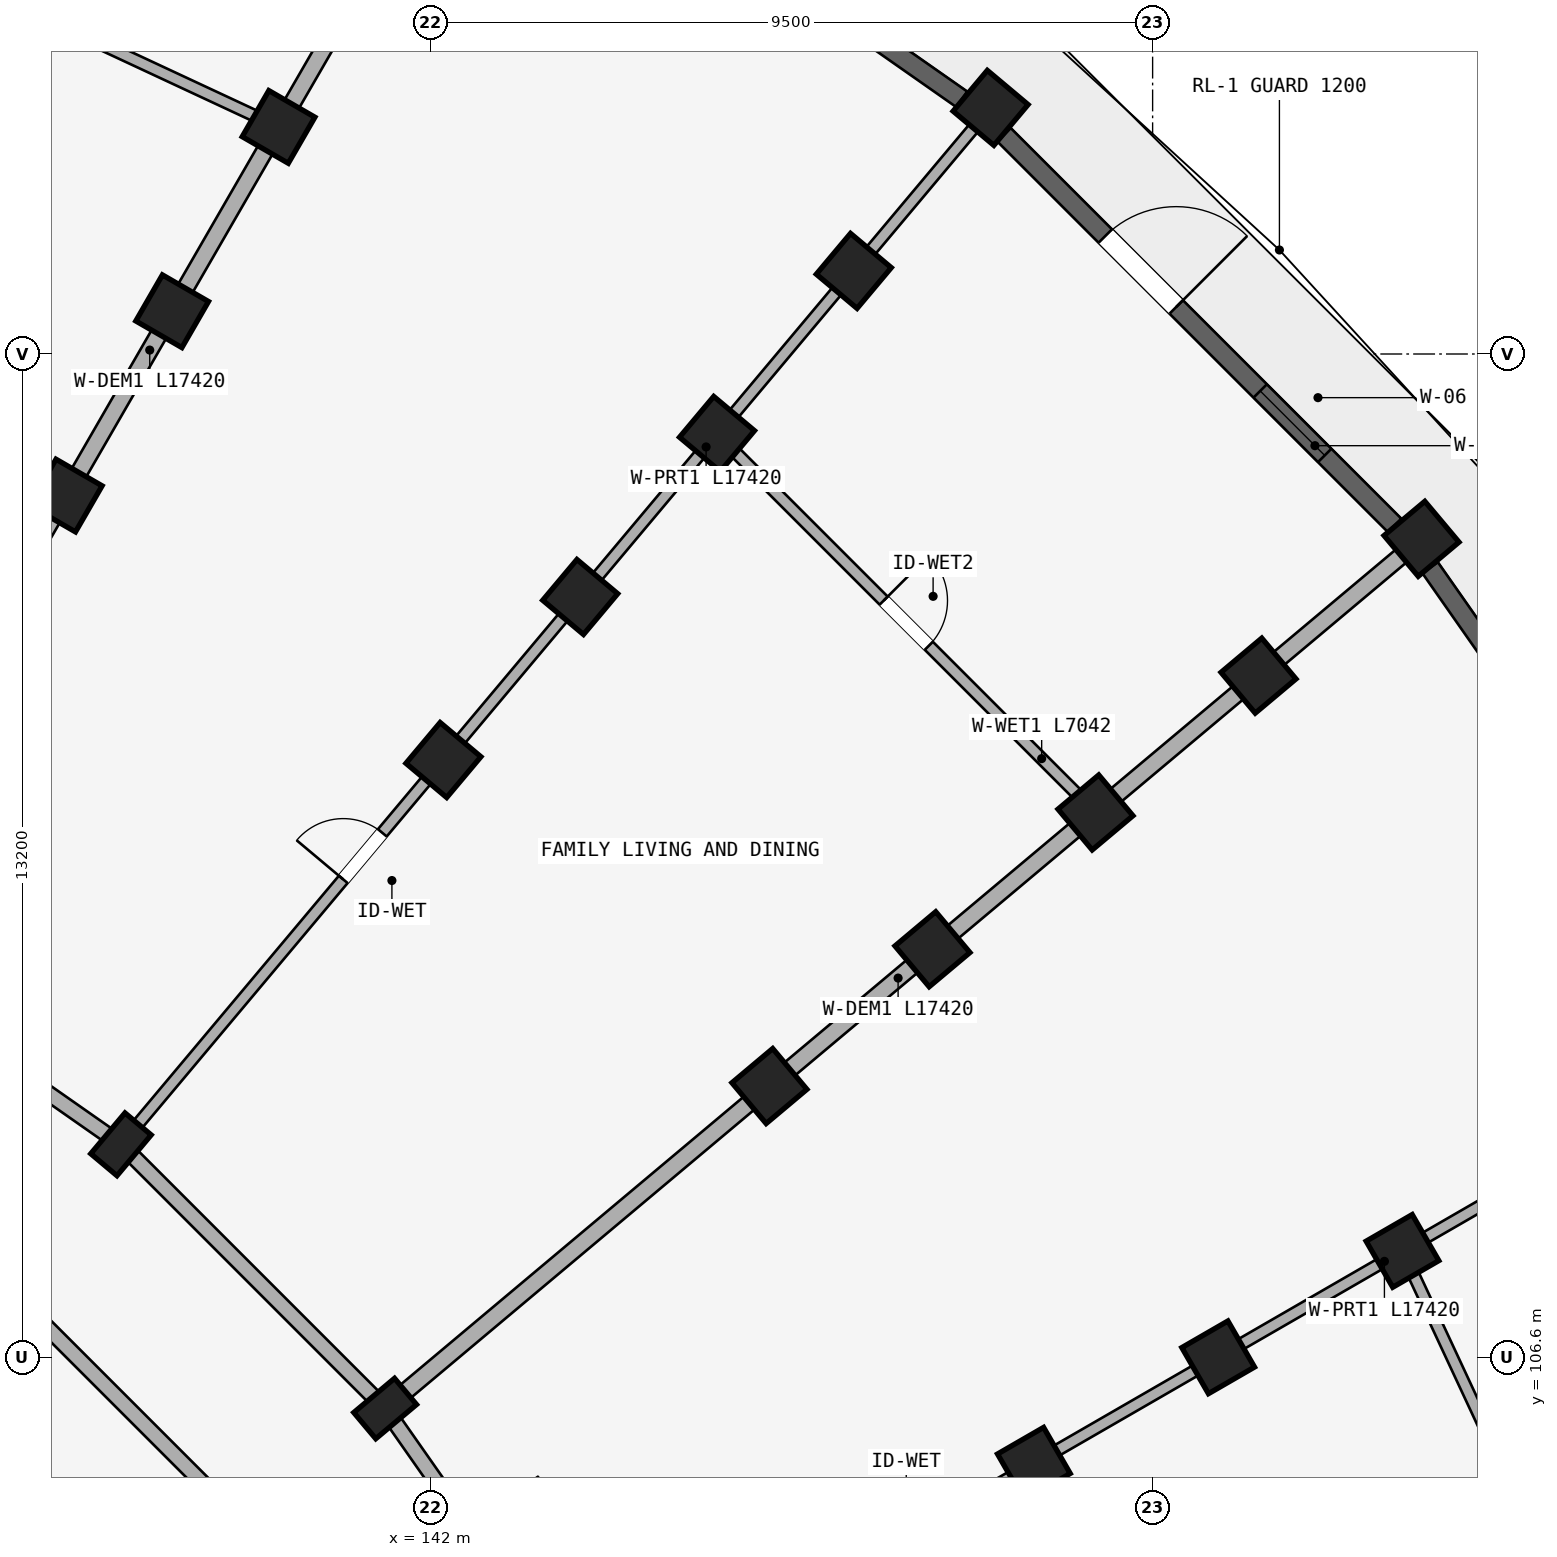
"""IFC4 building model, lengths in metres.
Left out: names, types, materials, properties, quantities, classifications, styles, units other than length and angle.
Written with IfcOpenShell. Run it as: python <this file> out.ifc"""

import sys

from ifc_helpers import new_model, si_unit, direction, frame, frame_2d, origin, origin_2d, place, context, subcontext, project, spatial, rectangle, extrude, element, fill, save


model = new_model("IFC4")
c1 = context("Model", 3, precision=1e-05, world=origin(), true_north=direction((0.0, 1.0)))
c2 = subcontext(c1, "Body", "Model", "MODEL_VIEW")
j1 = project(units=[si_unit("LENGTHUNIT", "METRE"), si_unit("PLANEANGLEUNIT", "RADIAN")], contexts=[c1])
p1 = place(None, origin())
s1 = spatial("IfcSite", under=j1, at=p1, CompositionType="ELEMENT")
p2 = place(p1, origin())
s2 = spatial("IfcBuilding", under=s1, at=p2, CompositionType="ELEMENT")
p3 = place(p2, frame((0.0, 0.0, 21.3)))
s3 = spatial("IfcBuildingStorey", under=s2, at=p3, CompositionType="ELEMENT", Elevation=21.3)
for number, where, z_axis, x_axis in (
    (1, (137.2, 117.938, 0.0), (0.0, 0.0, 1.0), (-0.866, 0.5, 0.0)),
    (2, (138.6, 120.363, 0.0), (0.0, 0.0, 1.0), (-0.866, 0.5, 0.0)),
    (3, (140.0, 122.787, 0.0), (0.0, 0.0, 1.0), (-0.866, 0.5, 0.0)),
):
    element("IfcColumn", number, at=place(p3, frame(where, z_axis=z_axis, x_axis=x_axis)), inside=s3, PredefinedType="COLUMN", context=c2, shape_type="SweptSolid", body=[
        extrude(rectangle(XDim=0.7, YDim=0.7, at=origin_2d()), origin(), (0.0, 0.0, 1.0), 2.93),
    ])
p4 = place(p3, frame((137.927, 109.402, 0.0), z_axis=(0.0, 0.0, 1.0), x_axis=(-0.766044443119, 0.642787609687, 0.0)))
e4 = element("IfcColumn", 4, at=p4, inside=s3, PredefinedType="COLUMN", context=c2, shape_type="SweptSolid", body=[
    extrude(rectangle(XDim=0.45, YDim=0.7, at=origin_2d()), origin(), (0.0, 0.0, 1.0), 2.93),
])
for number, where, z_axis, x_axis in (
    (5, (142.169, 114.458, 0.0), (0.0, 0.0, 1.0), (-0.766, 0.643, 0.0)),
    (6, (143.969, 116.603, 0.0), (0.0, 0.0, 1.0), (-0.766, 0.643, 0.0)),
    (7, (145.769, 118.748, 0.0), (0.0, 0.0, 1.0), (-0.766, 0.643, 0.0)),
    (8, (147.568, 120.893, 0.0), (0.0, 0.0, 1.0), (-0.766, 0.643, 0.0)),
    (9, (149.368, 123.038, 0.0), (0.0, 0.0, 1.0), (-0.766, 0.643, 0.0)),
):
    element("IfcColumn", number, at=place(p3, frame(where, z_axis=z_axis, x_axis=x_axis)), inside=s3, PredefinedType="COLUMN", context=c2, shape_type="SweptSolid", body=[
        extrude(rectangle(XDim=0.7, YDim=0.7, at=origin_2d()), origin(), (0.0, 0.0, 1.0), 2.93),
    ])
p5 = place(p3, frame((141.402, 105.927, 0.0), z_axis=(0.0, 0.0, 1.0), x_axis=(-0.642787609687, 0.766044443119, 0.0)))
e10 = element("IfcColumn", 10, at=p5, inside=s3, PredefinedType="COLUMN", context=c2, shape_type="SweptSolid", body=[
    extrude(rectangle(XDim=0.45, YDim=0.7, at=origin_2d()), origin(), (0.0, 0.0, 1.0), 2.93),
])
for number, where, z_axis, x_axis in (
    (11, (146.458, 110.169, 0.0), (0.0, 0.0, 1.0), (-0.643, 0.766, 0.0)),
    (12, (148.603, 111.969, 0.0), (0.0, 0.0, 1.0), (-0.643, 0.766, 0.0)),
    (13, (150.748, 113.769, 0.0), (0.0, 0.0, 1.0), (-0.643, 0.766, 0.0)),
    (14, (152.893, 115.568, 0.0), (0.0, 0.0, 1.0), (-0.643, 0.766, 0.0)),
    (15, (155.038, 117.368, 0.0), (0.0, 0.0, 1.0), (-0.643, 0.766, 0.0)),
    (16, (149.938, 105.2, 0.0), (0.0, 0.0, 1.0), (-0.5, 0.866, 0.0)),
    (17, (152.363, 106.6, 0.0), (0.0, 0.0, 1.0), (-0.5, 0.866, 0.0)),
    (18, (154.787, 108.0, 0.0), (0.0, 0.0, 1.0), (-0.5, 0.866, 0.0)),
):
    element("IfcColumn", number, at=place(p3, frame(where, z_axis=z_axis, x_axis=x_axis)), inside=s3, PredefinedType="COLUMN", context=c2, shape_type="SweptSolid", body=[
        extrude(rectangle(XDim=0.7, YDim=0.7, at=origin_2d()), origin(), (0.0, 0.0, 1.0), 2.93),
    ])
p6 = place(p3, frame((133.9, 112.222, 0.0), z_axis=(0.0, 0.0, 1.0), x_axis=(0.819140911474, -0.573592335331, 0.0)))
e19 = element("IfcWall", 19, at=p6, inside=s3, PredefinedType="STANDARD", context=c2, shape_type="SweptSolid", body=[
    extrude(rectangle(XDim=4.916, YDim=0.2, at=frame_2d((2.458, 0.0))), origin(), (0.0, 0.0, 1.0), 2.372),
])
p7 = place(p6, frame((1.918, 0.0, 0.0)))
e20 = element("IfcOpeningElement", 20, at=p7, cuts=e19, PredefinedType="OPENING", context=c2, shape_type="SweptSolid", body=[
    extrude(rectangle(XDim=1.08, YDim=2.15, at=frame_2d((0.54, 1.075))), frame((0.0, 0.11, 0.0), z_axis=(0.0, -1.0, 0.0), x_axis=(1.0, 0.0, 0.0)), (0.0, 0.0, 1.0), 0.22),
])
p8 = place(p3, frame((136.384, 107.564, 0.0), z_axis=(0.0, 0.0, 1.0), x_axis=(0.707106781187, -0.707106781187, 0.0)))
e21 = element("IfcWall", 21, at=p8, inside=s3, PredefinedType="STANDARD", context=c2, shape_type="SweptSolid", body=[
    extrude(rectangle(XDim=4.497, YDim=0.2, at=frame_2d((2.249, 0.0))), origin(), (0.0, 0.0, 1.0), 2.372),
])
p9 = place(p3, frame((137.927, 109.402, 0.0), z_axis=(0.0, 0.0, 1.0), x_axis=(0.707106781187, -0.707106781187, 0.0)))
e22 = element("IfcWall", 22, at=p9, inside=s3, PredefinedType="STANDARD", context=c2, shape_type="SweptSolid", body=[
    extrude(rectangle(XDim=4.916, YDim=0.2, at=frame_2d((2.458, 0.0))), origin(), (0.0, 0.0, 1.0), 2.372),
])
p10 = place(p3, frame((141.402, 105.927, 0.0), z_axis=(0.0, 0.0, 1.0), x_axis=(0.573592335331, -0.819140911474, 0.0)))
e23 = element("IfcWall", 23, at=p10, inside=s3, PredefinedType="STANDARD", context=c2, shape_type="SweptSolid", body=[
    extrude(rectangle(XDim=4.916, YDim=0.2, at=frame_2d((2.458, 0.0))), origin(), (0.0, 0.0, 1.0), 2.372),
])
p11 = place(p10, frame((1.888, 0.0, 0.0)))
e24 = element("IfcOpeningElement", 24, at=p11, cuts=e23, PredefinedType="OPENING", context=c2, shape_type="SweptSolid", body=[
    extrude(rectangle(XDim=1.14, YDim=2.15, at=frame_2d((0.57, 1.075))), frame((0.0, 0.11, 0.0), z_axis=(0.0, -1.0, 0.0), x_axis=(1.0, 0.0, 0.0)), (0.0, 0.0, 1.0), 0.22),
])
p12 = place(p3, frame((133.95, 112.309, 0.0), z_axis=(0.0, 0.0, 1.0), x_axis=(0.499997843263, 0.866026648973, 0.0)))
e25 = element("IfcWall", 25, at=p12, inside=s3, PredefinedType="STANDARD", context=c2, shape_type="SweptSolid", body=[
    extrude(rectangle(XDim=17.42, YDim=0.22, at=frame_2d((8.71, 0.0))), origin(), (0.0, 0.0, 1.0), 2.372),
])
p13 = place(p3, frame((137.991, 109.479, 0.0), z_axis=(0.0, 0.0, 1.0), x_axis=(0.642784757967, 0.766046835987, 0.0)))
e26 = element("IfcWall", 26, at=p13, inside=s3, PredefinedType="PARTITIONING", context=c2, shape_type="SweptSolid", body=[
    extrude(rectangle(XDim=17.42, YDim=0.15, at=frame_2d((8.71, 0.0))), origin(), (0.0, 0.0, 1.0), 2.372),
])
p14 = place(p13, frame((4.45, 0.0, 0.0)))
e27 = element("IfcOpeningElement", 27, at=p14, cuts=e26, PredefinedType="OPENING", context=c2, shape_type="SweptSolid", body=[
    extrude(rectangle(XDim=0.8, YDim=2.1, at=frame_2d((0.4, 1.05))), frame((0.0, 0.085, 0.0), z_axis=(0.0, -1.0, 0.0), x_axis=(1.0, 0.0, 0.0)), (0.0, 0.0, 1.0), 0.17),
])
p15 = place(p3, frame((141.479, 105.991, 0.0), z_axis=(0.0, 0.0, 1.0), x_axis=(0.766046835987, 0.642784757967, 0.0)))
e28 = element("IfcWall", 28, at=p15, inside=s3, PredefinedType="STANDARD", context=c2, shape_type="SweptSolid", body=[
    extrude(rectangle(XDim=17.42, YDim=0.22, at=frame_2d((8.71, 0.0))), origin(), (0.0, 0.0, 1.0), 2.372),
])
p16 = place(p3, frame((144.309, 101.95, 0.0), z_axis=(0.0, 0.0, 1.0), x_axis=(0.866026648973, 0.499997843263, 0.0)))
e29 = element("IfcWall", 29, at=p16, inside=s3, PredefinedType="PARTITIONING", context=c2, shape_type="SweptSolid", body=[
    extrude(rectangle(XDim=17.42, YDim=0.15, at=frame_2d((8.71, 0.0))), origin(), (0.0, 0.0, 1.0), 2.372),
])
p17 = place(p16, frame((4.45, 0.0, 0.0)))
e30 = element("IfcOpeningElement", 30, at=p17, cuts=e29, PredefinedType="OPENING", context=c2, shape_type="SweptSolid", body=[
    extrude(rectangle(XDim=0.8, YDim=2.1, at=frame_2d((0.4, 1.05))), frame((0.0, 0.085, 0.0), z_axis=(0.0, -1.0, 0.0), x_axis=(1.0, 0.0, 0.0)), (0.0, 0.0, 1.0), 0.17),
])
p18 = place(p3, frame((133.618, 125.764, 0.0), z_axis=(0.0, 0.0, 1.0), x_axis=(0.906297360311, -0.422640621205, 0.0)))
e31 = element("IfcWall", 31, at=p18, inside=s3, PredefinedType="PLUMBINGWALL", context=c2, shape_type="SweptSolid", body=[
    extrude(rectangle(XDim=7.042, YDim=0.15, at=frame_2d((3.521, 0.0))), origin(), (0.0, 0.0, 1.0), 2.372),
])
p19 = place(p18, frame((3.141, 0.0, 0.0)))
e32 = element("IfcOpeningElement", 32, at=p19, cuts=e31, PredefinedType="OPENING", context=c2, shape_type="SweptSolid", body=[
    extrude(rectangle(XDim=0.76, YDim=2.05, at=frame_2d((0.38, 1.025))), frame((0.0, 0.085, 0.0), z_axis=(0.0, -1.0, 0.0), x_axis=(1.0, 0.0, 0.0)), (0.0, 0.0, 1.0), 0.17),
])
p20 = place(p3, frame((145.769, 118.748, 0.0), z_axis=(0.0, 0.0, 1.0), x_axis=(0.707106781187, -0.707106781187, 0.0)))
e33 = element("IfcWall", 33, at=p20, inside=s3, PredefinedType="PLUMBINGWALL", context=c2, shape_type="SweptSolid", body=[
    extrude(rectangle(XDim=7.042, YDim=0.15, at=frame_2d((3.521, 0.0))), origin(), (0.0, 0.0, 1.0), 2.372),
])
p21 = place(p20, frame((3.101, 0.0, 0.0)))
e34 = element("IfcOpeningElement", 34, at=p21, cuts=e33, PredefinedType="OPENING", context=c2, shape_type="SweptSolid", body=[
    extrude(rectangle(XDim=0.84, YDim=2.1, at=frame_2d((0.42, 1.05))), frame((0.0, 0.085, 0.0), z_axis=(0.0, -1.0, 0.0), x_axis=(1.0, 0.0, 0.0)), (0.0, 0.0, 1.0), 0.17),
])
p22 = place(p3, frame((154.787, 108.0, 0.0), z_axis=(0.0, 0.0, 1.0), x_axis=(0.422640621205, -0.906297360311, 0.0)))
e35 = element("IfcWall", 35, at=p22, inside=s3, PredefinedType="PLUMBINGWALL", context=c2, shape_type="SweptSolid", body=[
    extrude(rectangle(XDim=7.042, YDim=0.15, at=frame_2d((3.521, 0.0))), origin(), (0.0, 0.0, 1.0), 2.372),
])
p23 = place(p22, frame((3.121, 0.0, 0.0)))
e36 = element("IfcOpeningElement", 36, at=p23, cuts=e35, PredefinedType="OPENING", context=c2, shape_type="SweptSolid", body=[
    extrude(rectangle(XDim=0.8, YDim=2.1, at=frame_2d((0.4, 1.05))), frame((0.0, 0.085, 0.0), z_axis=(0.0, -1.0, 0.0), x_axis=(1.0, 0.0, 0.0)), (0.0, 0.0, 1.0), 0.17),
])
p24 = place(p3, frame((143.036, 127.319, 0.0), z_axis=(0.0, 0.0, 1.0), x_axis=(0.819159308599, -0.573566061701, 0.0)))
e37 = element("IfcWall", 37, at=p24, inside=s3, PredefinedType="STANDARD", context=c2, shape_type="SweptSolid", body=[
    extrude(rectangle(XDim=7.267, YDim=0.25, at=frame_2d((3.633, 0.0))), origin(), (0.0, 0.0, 1.0), 2.472),
])
p25 = place(p24, frame((2.508, 0.0, 0.322)))
e38 = element("IfcOpeningElement", 38, at=p25, cuts=e37, PredefinedType="OPENING", context=c2, shape_type="SweptSolid", body=[
    extrude(rectangle(XDim=2.25, YDim=1.95, at=frame_2d((1.125, 0.975))), frame((0.0, 0.135, 0.0), z_axis=(0.0, -1.0, 0.0), x_axis=(1.0, 0.0, 0.0)), (0.0, 0.0, 1.0), 0.27),
])
p26 = place(p3, frame((149.546, 122.684, 0.0), z_axis=(0.0, 0.0, 1.0), x_axis=(0.707106781187, -0.707106781187, 0.0)))
e39 = element("IfcWall", 39, at=p26, inside=s3, PredefinedType="STANDARD", context=c2, shape_type="SweptSolid", body=[
    extrude(rectangle(XDim=7.267, YDim=0.25, at=frame_2d((3.633, 0.0))), origin(), (0.0, 0.0, 1.0), 2.472),
])
p27 = place(p26, frame((4.766, 0.0, 0.472)))
e40 = element("IfcOpeningElement", 40, at=p27, cuts=e39, PredefinedType="OPENING", context=c2, shape_type="SweptSolid", body=[
    extrude(rectangle(XDim=1.2, YDim=1.5, at=frame_2d((0.6, 0.75))), frame((0.0, 0.135, 0.0), z_axis=(0.0, -1.0, 0.0), x_axis=(1.0, 0.0, 0.0)), (0.0, 0.0, 1.0), 0.27),
])
p28 = place(p26, frame((1.883, 0.0, 0.0)))
e41 = element("IfcOpeningElement", 41, at=p28, cuts=e39, PredefinedType="OPENING", context=c2, shape_type="SweptSolid", body=[
    extrude(rectangle(XDim=1.32, YDim=2.15, at=frame_2d((0.66, 1.075))), frame((0.0, 0.135, 0.0), z_axis=(0.0, -1.0, 0.0), x_axis=(1.0, 0.0, 0.0)), (0.0, 0.0, 1.0), 0.27),
])
p29 = place(p3, frame((155.151, 116.989, 0.0), z_axis=(0.0, 0.0, 1.0), x_axis=(0.573566061701, -0.819159308599, 0.0)))
e42 = element("IfcWall", 42, at=p29, inside=s3, PredefinedType="STANDARD", context=c2, shape_type="SweptSolid", body=[
    extrude(rectangle(XDim=7.267, YDim=0.25, at=frame_2d((3.633, 0.0))), origin(), (0.0, 0.0, 1.0), 2.472),
])
p30 = place(p29, frame((2.658, 0.0, 0.422)))
e43 = element("IfcOpeningElement", 43, at=p30, cuts=e42, PredefinedType="OPENING", context=c2, shape_type="SweptSolid", body=[
    extrude(rectangle(XDim=1.95, YDim=1.85, at=frame_2d((0.975, 0.925))), frame((0.0, 0.135, 0.0), z_axis=(0.0, -1.0, 0.0), x_axis=(1.0, 0.0, 0.0)), (0.0, 0.0, 1.0), 0.27),
])
p31 = place(p27, origin())
e44 = element("IfcWindow", 44, at=p31, inside=s3, PartitioningType="SINGLE_PANEL", PredefinedType="WINDOW", context=c2, shape_type="SweptSolid", body=[
    extrude(rectangle(XDim=1.2, YDim=1.5, at=frame_2d((0.6, 0.75))), frame((0.0, 0.03, 0.0), z_axis=(0.0, -1.0, 0.0), x_axis=(1.0, 0.0, 0.0)), (0.0, 0.0, 1.0), 0.06),
])
fill(e40, e44)
p32 = place(p14, origin())
e45 = element("IfcDoor", 45, at=p32, inside=s3, OperationType="SINGLE_SWING_LEFT", PredefinedType="DOOR", context=c2, shape_type="SweptSolid", body=[
    extrude(rectangle(XDim=0.8, YDim=2.1, at=frame_2d((0.4, 1.05))), frame((0.0, 0.025, 0.0), z_axis=(0.0, -1.0, 0.0), x_axis=(1.0, 0.0, 0.0)), (0.0, 0.0, 1.0), 0.05),
])
fill(e27, e45)
p33 = place(p21, frame((0.84, 0.0, 0.0), z_axis=(0.0, 0.0, 1.0), x_axis=(-1.0, 0.0, 0.0)))
e46 = element("IfcDoor", 46, at=p33, inside=s3, OperationType="SINGLE_SWING_RIGHT", PredefinedType="DOOR", context=c2, shape_type="SweptSolid", body=[
    extrude(rectangle(XDim=0.84, YDim=2.1, at=frame_2d((0.42, 1.05))), frame((0.0, 0.025, 0.0), z_axis=(0.0, -1.0, 0.0), x_axis=(1.0, 0.0, 0.0)), (0.0, 0.0, 1.0), 0.05),
])
fill(e34, e46)
p34 = place(p28, origin())
e47 = element("IfcDoor", 47, at=p34, inside=s3, OperationType="SINGLE_SWING_RIGHT", PredefinedType="DOOR", context=c2, shape_type="SweptSolid", body=[
    extrude(rectangle(XDim=1.32, YDim=2.15, at=frame_2d((0.66, 1.075))), frame((0.0, 0.025, 0.0), z_axis=(0.0, -1.0, 0.0), x_axis=(1.0, 0.0, 0.0)), (0.0, 0.0, 1.0), 0.05),
])
fill(e41, e47)
save(model, sys.argv[1])
